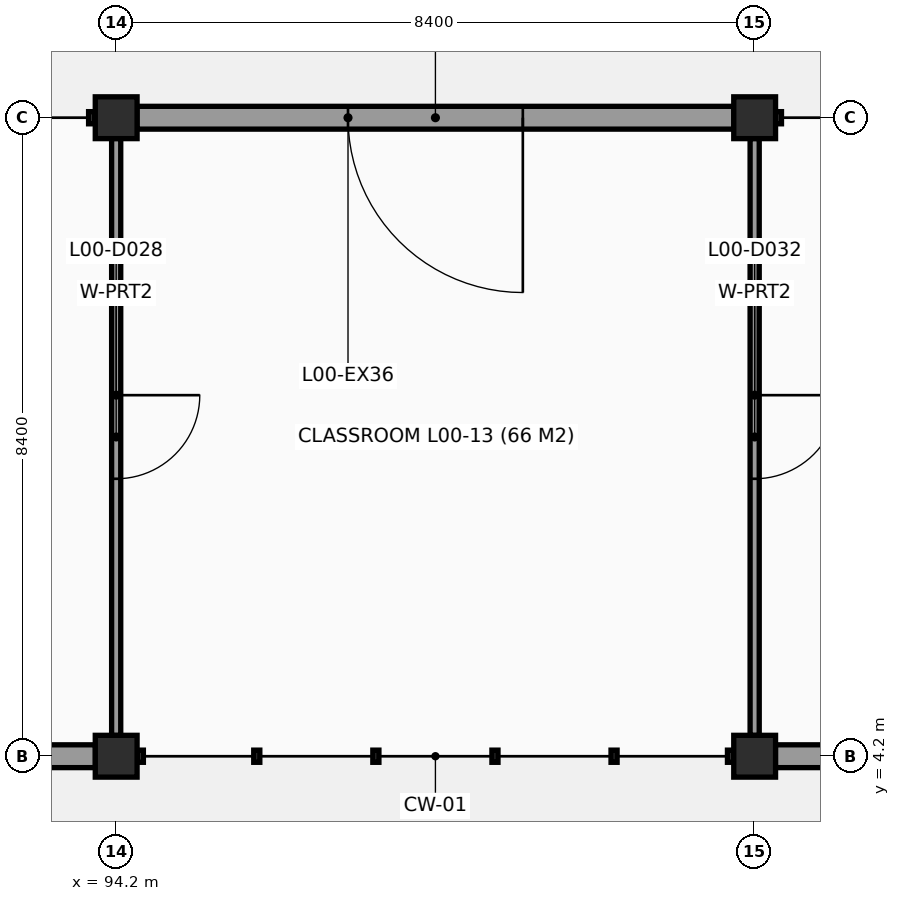
"""IFC4 building model, lengths in metres.
Left out: names, types, materials, properties, quantities, classifications, styles, units other than length and angle.
Written with IfcOpenShell. Run it as: python <this file> out.ifc"""

import sys

from ifc_helpers import new_model, si_unit, direction, frame, frame_2d, origin, origin_2d, place, context, subcontext, project, spatial, rectangle, extrude, element, fill, save


model = new_model("IFC4")
c1 = context("Model", 3, precision=1e-05, world=origin(), true_north=direction((0.0, 1.0)))
c2 = subcontext(c1, "Body", "Model", "MODEL_VIEW")
j1 = project(units=[si_unit("LENGTHUNIT", "METRE"), si_unit("PLANEANGLEUNIT", "RADIAN")], contexts=[c1])
p1 = place(None, origin())
s1 = spatial("IfcSite", under=j1, at=p1, CompositionType="ELEMENT")
p2 = place(p1, origin())
s2 = spatial("IfcBuilding", under=s1, at=p2, CompositionType="ELEMENT")
p3 = place(p2, origin())
s3 = spatial("IfcBuildingStorey", under=s2, at=p3, CompositionType="ELEMENT", Elevation=0.0)
for number, where, z_axis, x_axis in (
    (1, (94.2, 4.2, -0.4), (0.0, 0.0, 1.0), (1.0, 0.0, 0.0)),
    (2, (94.2, 12.6, -0.4), (0.0, 0.0, 1.0), (1.0, 0.0, 0.0)),
    (3, (102.6, 4.2, -0.4), (0.0, 0.0, 1.0), (1.0, 0.0, 0.0)),
    (4, (102.6, 12.6, -0.4), (0.0, 0.0, 1.0), (1.0, 0.0, 0.0)),
):
    element("IfcColumn", number, at=place(p3, frame(where, z_axis=z_axis, x_axis=x_axis)), inside=s3, PredefinedType="COLUMN", context=c2, shape_type="SweptSolid", body=[
        extrude(rectangle(XDim=0.55, YDim=0.55, at=origin_2d()), origin(), (0.0, 0.0, 1.0), 4.6),
    ])
p4 = place(p3, frame((109.552, 4.2, 0.0), z_axis=(0.0, 0.0, 1.0), x_axis=(-1.0, 0.0, 0.0)))
e5 = element("IfcWall", 5, at=p4, inside=s3, PredefinedType="SOLIDWALL", context=c2, shape_type="SweptSolid", body=[
    extrude(rectangle(XDim=6.679, YDim=0.3, at=frame_2d((3.339, 0.0))), origin(), (0.0, 0.0, 1.0), 3.22),
])
p5 = place(p3, frame((93.927, 4.2, 0.0), z_axis=(0.0, 0.0, 1.0), x_axis=(-1.0, 0.0, 0.0)))
e6 = element("IfcWall", 6, at=p5, inside=s3, PredefinedType="SOLIDWALL", context=c2, shape_type="SweptSolid", body=[
    extrude(rectangle(XDim=7.854, YDim=0.3, at=frame_2d((3.927, 0.0))), origin(), (0.0, 0.0, 1.0), 3.22),
])
p6 = place(p5, frame((2.677, 0.0, 0.0)))
e7 = element("IfcOpeningElement", 7, at=p6, cuts=e6, PredefinedType="OPENING", context=c2, shape_type="SweptSolid", body=[
    extrude(rectangle(XDim=2.5, YDim=2.5, at=frame_2d((1.25, 1.25))), frame((0.0, 0.16, 0.0), z_axis=(0.0, -1.0, 0.0), x_axis=(1.0, 0.0, 0.0)), (0.0, 0.0, 1.0), 0.32),
])
p7 = place(p3, frame((94.473, 12.6, 0.0), z_axis=(0.0, 0.0, 1.0), x_axis=(1.0, 0.0, 0.0)))
e8 = element("IfcWall", 8, at=p7, inside=s3, PredefinedType="SOLIDWALL", context=c2, shape_type="SweptSolid", body=[
    extrude(rectangle(XDim=7.854, YDim=0.3, at=frame_2d((3.927, 0.0))), origin(), (0.0, 0.0, 1.0), 3.22),
])
p8 = place(p7, frame((2.777, 0.0, 0.0)))
e9 = element("IfcOpeningElement", 9, at=p8, cuts=e8, PredefinedType="OPENING", context=c2, shape_type="SweptSolid", body=[
    extrude(rectangle(XDim=2.3, YDim=2.4, at=frame_2d((1.15, 1.2))), frame((0.0, 0.16, 0.0), z_axis=(0.0, -1.0, 0.0), x_axis=(1.0, 0.0, 0.0)), (0.0, 0.0, 1.0), 0.32),
])
p9 = place(p3, frame((94.2, 12.327, 0.0), z_axis=(0.0, 0.0, 1.0), x_axis=(0.0, -1.0, 0.0)))
e10 = element("IfcWall", 10, at=p9, inside=s3, PredefinedType="PARTITIONING", context=c2, shape_type="SweptSolid", body=[
    extrude(rectangle(XDim=7.854, YDim=0.12, at=frame_2d((3.927, 0.0))), origin(), (0.0, 0.0, 1.0), 3.52),
])
p10 = place(p9, frame((3.377, 0.0, 0.0)))
e11 = element("IfcOpeningElement", 11, at=p10, cuts=e10, PredefinedType="OPENING", context=c2, shape_type="SweptSolid", body=[
    extrude(rectangle(XDim=1.1, YDim=2.1, at=frame_2d((0.55, 1.05))), frame((0.0, 0.07, 0.0), z_axis=(0.0, -1.0, 0.0), x_axis=(1.0, 0.0, 0.0)), (0.0, 0.0, 1.0), 0.14),
])
p11 = place(p3, frame((102.6, 12.327, 0.0), z_axis=(0.0, 0.0, 1.0), x_axis=(0.0, -1.0, 0.0)))
e12 = element("IfcWall", 12, at=p11, inside=s3, PredefinedType="PARTITIONING", context=c2, shape_type="SweptSolid", body=[
    extrude(rectangle(XDim=7.854, YDim=0.12, at=frame_2d((3.927, 0.0))), origin(), (0.0, 0.0, 1.0), 3.56),
])
p12 = place(p11, frame((3.377, 0.0, 0.0)))
e13 = element("IfcOpeningElement", 13, at=p12, cuts=e12, PredefinedType="OPENING", context=c2, shape_type="SweptSolid", body=[
    extrude(rectangle(XDim=1.1, YDim=2.1, at=frame_2d((0.55, 1.05))), frame((0.0, 0.07, 0.0), z_axis=(0.0, -1.0, 0.0), x_axis=(1.0, 0.0, 0.0)), (0.0, 0.0, 1.0), 0.14),
])
p13 = place(p8, origin())
e14 = element("IfcDoor", 14, at=p13, inside=s3, OperationType="DOUBLE_DOOR_SINGLE_SWING", PredefinedType="DOOR", context=c2, shape_type="SweptSolid", body=[
    extrude(rectangle(XDim=2.3, YDim=2.4, at=frame_2d((1.15, 1.2))), frame((0.0, 0.025, 0.0), z_axis=(0.0, -1.0, 0.0), x_axis=(1.0, 0.0, 0.0)), (0.0, 0.0, 1.0), 0.05),
])
fill(e9, e14)
p14 = place(p10, origin())
e15 = element("IfcDoor", 15, at=p14, inside=s3, OperationType="SINGLE_SWING_LEFT", PredefinedType="DOOR", context=c2, shape_type="SweptSolid", body=[
    extrude(rectangle(XDim=1.1, YDim=2.1, at=frame_2d((0.55, 1.05))), frame((0.0, 0.025, 0.0), z_axis=(0.0, -1.0, 0.0), x_axis=(1.0, 0.0, 0.0)), (0.0, 0.0, 1.0), 0.05),
])
fill(e11, e15)
p15 = place(p12, origin())
e16 = element("IfcDoor", 16, at=p15, inside=s3, OperationType="SINGLE_SWING_LEFT", PredefinedType="DOOR", context=c2, shape_type="SweptSolid", body=[
    extrude(rectangle(XDim=1.1, YDim=2.1, at=frame_2d((0.55, 1.05))), frame((0.0, 0.025, 0.0), z_axis=(0.0, -1.0, 0.0), x_axis=(1.0, 0.0, 0.0)), (0.0, 0.0, 1.0), 0.05),
])
fill(e13, e16)
save(model, sys.argv[1])
